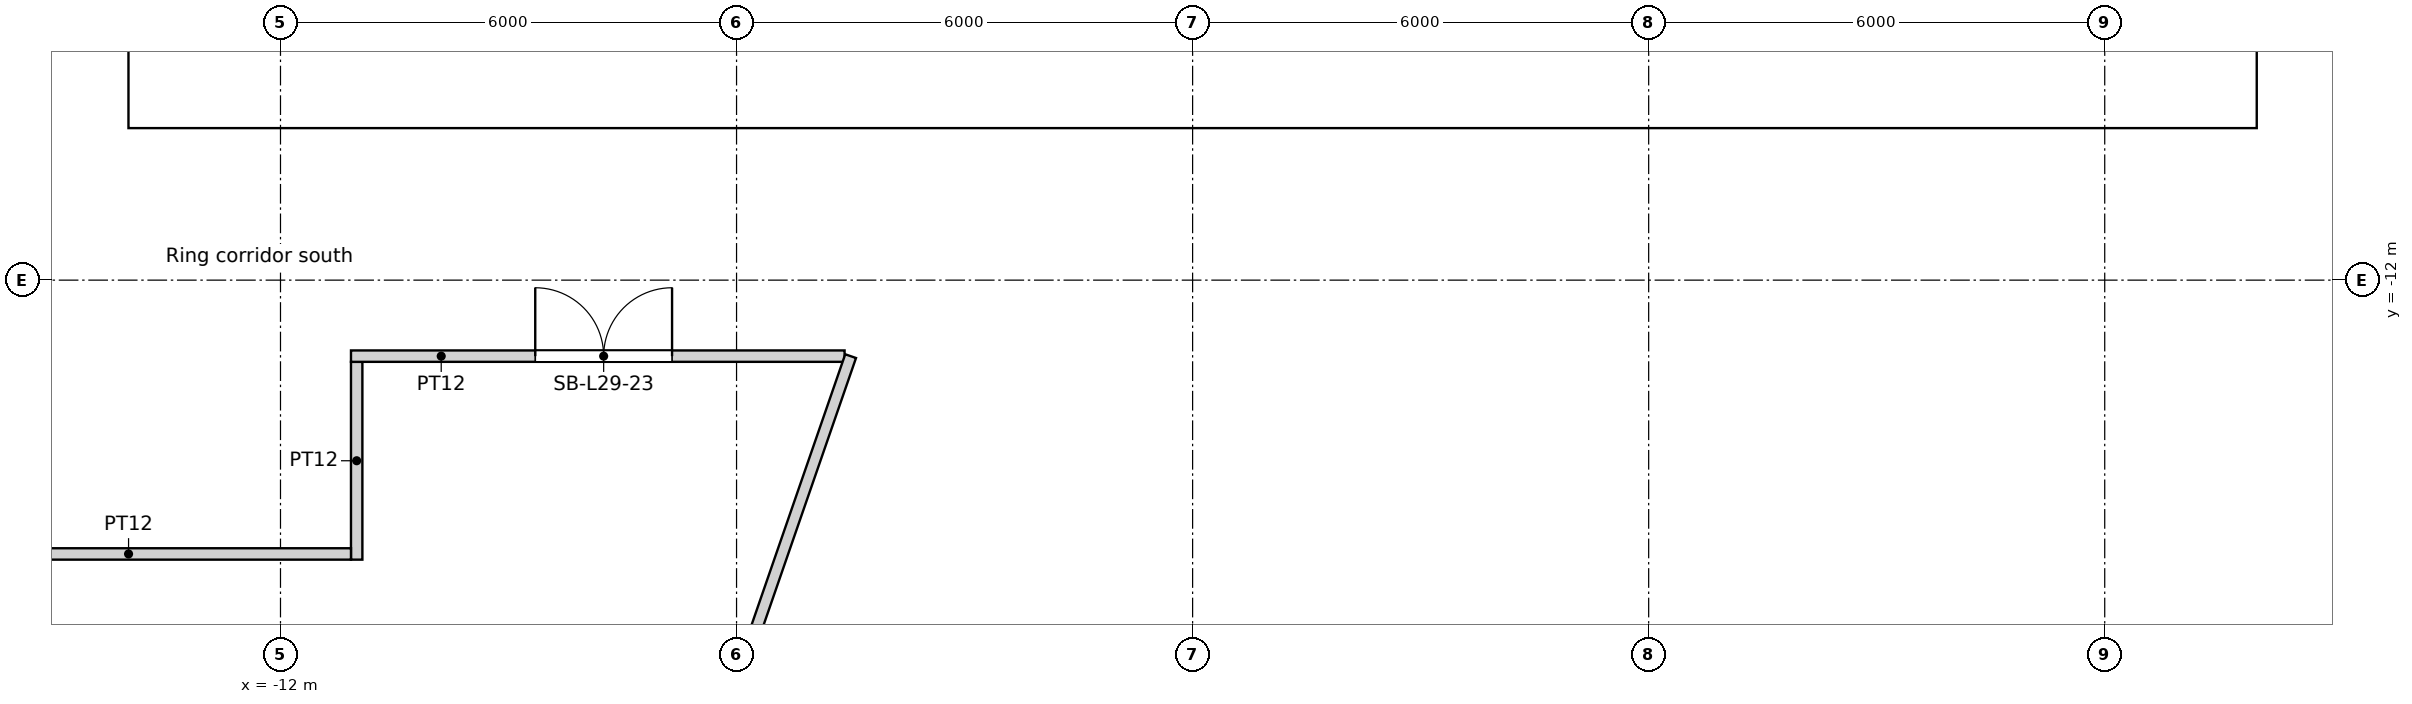
"""IFC4 building model, lengths in metres.
Left out: names, types, materials, properties, quantities, classifications, styles, units other than length and angle.
Written with IfcOpenShell. Run it as: python <this file> out.ifc"""

import sys

from ifc_helpers import new_model, si_unit, direction, frame, frame_2d, origin, origin_2d, place, context, subcontext, project, spatial, rectangle, circle, extrude, element, fill, save


model = new_model("IFC4")
c1 = context("Model", 3, precision=1e-05, world=origin(), true_north=direction((0.0, 1.0)))
c2 = subcontext(c1, "Body", "Model", "MODEL_VIEW")
j1 = project(units=[si_unit("LENGTHUNIT", "METRE"), si_unit("PLANEANGLEUNIT", "RADIAN")], contexts=[c1])
p1 = place(None, origin())
s1 = spatial("IfcSite", under=j1, at=p1, CompositionType="ELEMENT")
p2 = place(p1, origin())
s2 = spatial("IfcBuilding", under=s1, at=p2, CompositionType="ELEMENT")
p3 = place(p2, frame((0.0, 0.0, 114.6)))
s3 = spatial("IfcBuildingStorey", under=s2, at=p3, CompositionType="ELEMENT", Elevation=114.6)
for number, where, z_axis, x_axis in (
    (1, (-13.798, -12.802, 0.0), (0.0, 0.0, 1.0), (1.0, 0.0, 0.0)),
    (2, (-9.411, -16.301, 0.0), (0.0, 0.0, 1.0), (1.0, 0.0, 0.0)),
    (3, (11.735, -14.716, 0.0), (0.0, 0.0, 1.0), (1.0, 0.0, 0.0)),
    (4, (15.552, -10.603, 0.0), (0.0, 0.0, 1.0), (1.0, 0.0, 0.0)),
):
    element("IfcColumn", number, at=place(p3, frame(where, z_axis=z_axis, x_axis=x_axis)), inside=s3, PredefinedType="COLUMN", context=c2, shape_type="SweptSolid", body=[
        extrude(circle(Radius=0.7, at=origin_2d()), origin(), (0.0, 0.0, 1.0), 5.4),
    ])
p4 = place(p3, frame((-14.0, -9.4, 0.0), z_axis=(0.0, 0.0, 1.0), x_axis=(1.0, 0.0, 0.0)))
e5 = element("IfcWall", 5, at=p4, inside=s3, PredefinedType="SOLIDWALL", context=c2, shape_type="SweptSolid", body=[
    extrude(rectangle(XDim=28.0, YDim=1.2, at=frame_2d((14.0, 0.0))), origin(), (0.0, 0.0, 1.0), 5.4),
])
p5 = place(p4, frame((14.9, 0.0, 0.0)))
e6 = element("IfcOpeningElement", 6, at=p5, cuts=e5, PredefinedType="OPENING", context=c2, shape_type="SweptSolid", body=[
    extrude(rectangle(XDim=1.0, YDim=2.1, at=frame_2d((0.5, 1.05))), frame((0.0, 0.6, 0.0), z_axis=(0.0, -1.0, 0.0), x_axis=(1.0, 0.0, 0.0)), (0.0, 0.0, 1.0), 1.2),
])
p6 = place(p4, frame((9.8, 0.0, 0.0)))
e7 = element("IfcOpeningElement", 7, at=p6, cuts=e5, PredefinedType="OPENING", context=c2, shape_type="SweptSolid", body=[
    extrude(rectangle(XDim=1.8, YDim=2.1, at=frame_2d((0.9, 1.05))), frame((0.0, 0.6, 0.0), z_axis=(0.0, -1.0, 0.0), x_axis=(1.0, 0.0, 0.0)), (0.0, 0.0, 1.0), 1.2),
])
p7 = place(p4, frame((16.4, 0.0, 0.0)))
e8 = element("IfcOpeningElement", 8, at=p7, cuts=e5, PredefinedType="OPENING", context=c2, shape_type="SweptSolid", body=[
    extrude(rectangle(XDim=1.8, YDim=2.1, at=frame_2d((0.9, 1.05))), frame((0.0, 0.6, 0.0), z_axis=(0.0, -1.0, 0.0), x_axis=(1.0, 0.0, 0.0)), (0.0, 0.0, 1.0), 1.2),
])
p8 = place(p3, frame((-16.925, -15.602, 0.0), z_axis=(0.0, 0.0, 1.0), x_axis=(1.0, 0.0, 0.0)))
e9 = element("IfcWall", 9, at=p8, inside=s3, PredefinedType="PARTITIONING", context=c2, shape_type="SweptSolid", body=[
    extrude(rectangle(XDim=5.853, YDim=0.15, at=frame_2d((2.926, 0.0))), origin(), (0.0, 0.0, 1.0), 4.0),
])
p9 = place(p3, frame((-10.998, -15.677, 0.0), z_axis=(0.0, 0.0, 1.0), x_axis=(0.0, 1.0, 0.0)))
e10 = element("IfcWall", 10, at=p9, inside=s3, PredefinedType="PARTITIONING", context=c2, shape_type="SweptSolid", body=[
    extrude(rectangle(XDim=2.602, YDim=0.15, at=frame_2d((1.301, 0.0))), origin(), (0.0, 0.0, 1.0), 4.0),
])
p10 = place(p3, frame((-4.579, -13.0, 0.0), z_axis=(0.0, 0.0, 1.0), x_axis=(-1.0, 0.0, 0.0)))
e11 = element("IfcWall", 11, at=p10, inside=s3, PredefinedType="PARTITIONING", context=c2, shape_type="SweptSolid", body=[
    extrude(rectangle(XDim=6.494, YDim=0.15, at=frame_2d((3.247, 0.0))), origin(), (0.0, 0.0, 1.0), 4.0),
])
p11 = place(p10, frame((2.27, 0.0, 0.0)))
e12 = element("IfcOpeningElement", 12, at=p11, cuts=e11, PredefinedType="OPENING", context=c2, shape_type="SweptSolid", body=[
    extrude(rectangle(XDim=1.8, YDim=2.4, at=frame_2d((0.9, 1.2))), frame((0.0, 0.075, 0.0), z_axis=(0.0, -1.0, 0.0), x_axis=(1.0, 0.0, 0.0)), (0.0, 0.0, 1.0), 0.15),
])
p12 = place(p3, frame((-8.074, -23.329, 0.0), z_axis=(0.0, 0.0, 1.0), x_axis=(0.327069136832, 0.945000412557, 0.0)))
e13 = element("IfcWall", 13, at=p12, inside=s3, PredefinedType="PARTITIONING", context=c2, shape_type="SweptSolid", body=[
    extrude(rectangle(XDim=10.93, YDim=0.15, at=frame_2d((5.465, 0.0))), origin(), (0.0, 0.0, 1.0), 4.0),
])
p13 = place(p5, origin())
e14 = element("IfcDoor", 14, at=p13, inside=s3, OperationType="SINGLE_SWING_LEFT", PredefinedType="DOOR", context=c2, shape_type="SweptSolid", body=[
    extrude(rectangle(XDim=1.0, YDim=2.1, at=frame_2d((0.5, 1.05))), frame((0.0, 0.025, 0.0), z_axis=(0.0, -1.0, 0.0), x_axis=(1.0, 0.0, 0.0)), (0.0, 0.0, 1.0), 0.05),
])
fill(e6, e14)
p14 = place(p6, origin())
e15 = element("IfcDoor", 15, at=p14, inside=s3, OperationType="DOUBLE_DOOR_SINGLE_SWING", PredefinedType="DOOR", context=c2, shape_type="SweptSolid", body=[
    extrude(rectangle(XDim=1.8, YDim=2.1, at=frame_2d((0.9, 1.05))), frame((0.0, 0.025, 0.0), z_axis=(0.0, -1.0, 0.0), x_axis=(1.0, 0.0, 0.0)), (0.0, 0.0, 1.0), 0.05),
])
fill(e7, e15)
p15 = place(p7, origin())
e16 = element("IfcDoor", 16, at=p15, inside=s3, OperationType="DOUBLE_DOOR_SINGLE_SWING", PredefinedType="DOOR", context=c2, shape_type="SweptSolid", body=[
    extrude(rectangle(XDim=1.8, YDim=2.1, at=frame_2d((0.9, 1.05))), frame((0.0, 0.025, 0.0), z_axis=(0.0, -1.0, 0.0), x_axis=(1.0, 0.0, 0.0)), (0.0, 0.0, 1.0), 0.05),
])
fill(e8, e16)
p16 = place(p11, origin())
e17 = element("IfcDoor", 17, at=p16, inside=s3, OperationType="DOUBLE_DOOR_SINGLE_SWING", PredefinedType="DOOR", context=c2, shape_type="SweptSolid", body=[
    extrude(rectangle(XDim=1.8, YDim=2.4, at=frame_2d((0.9, 1.2))), frame((0.0, 0.025, 0.0), z_axis=(0.0, -1.0, 0.0), x_axis=(1.0, 0.0, 0.0)), (0.0, 0.0, 1.0), 0.05),
])
fill(e12, e17)
save(model, sys.argv[1])
